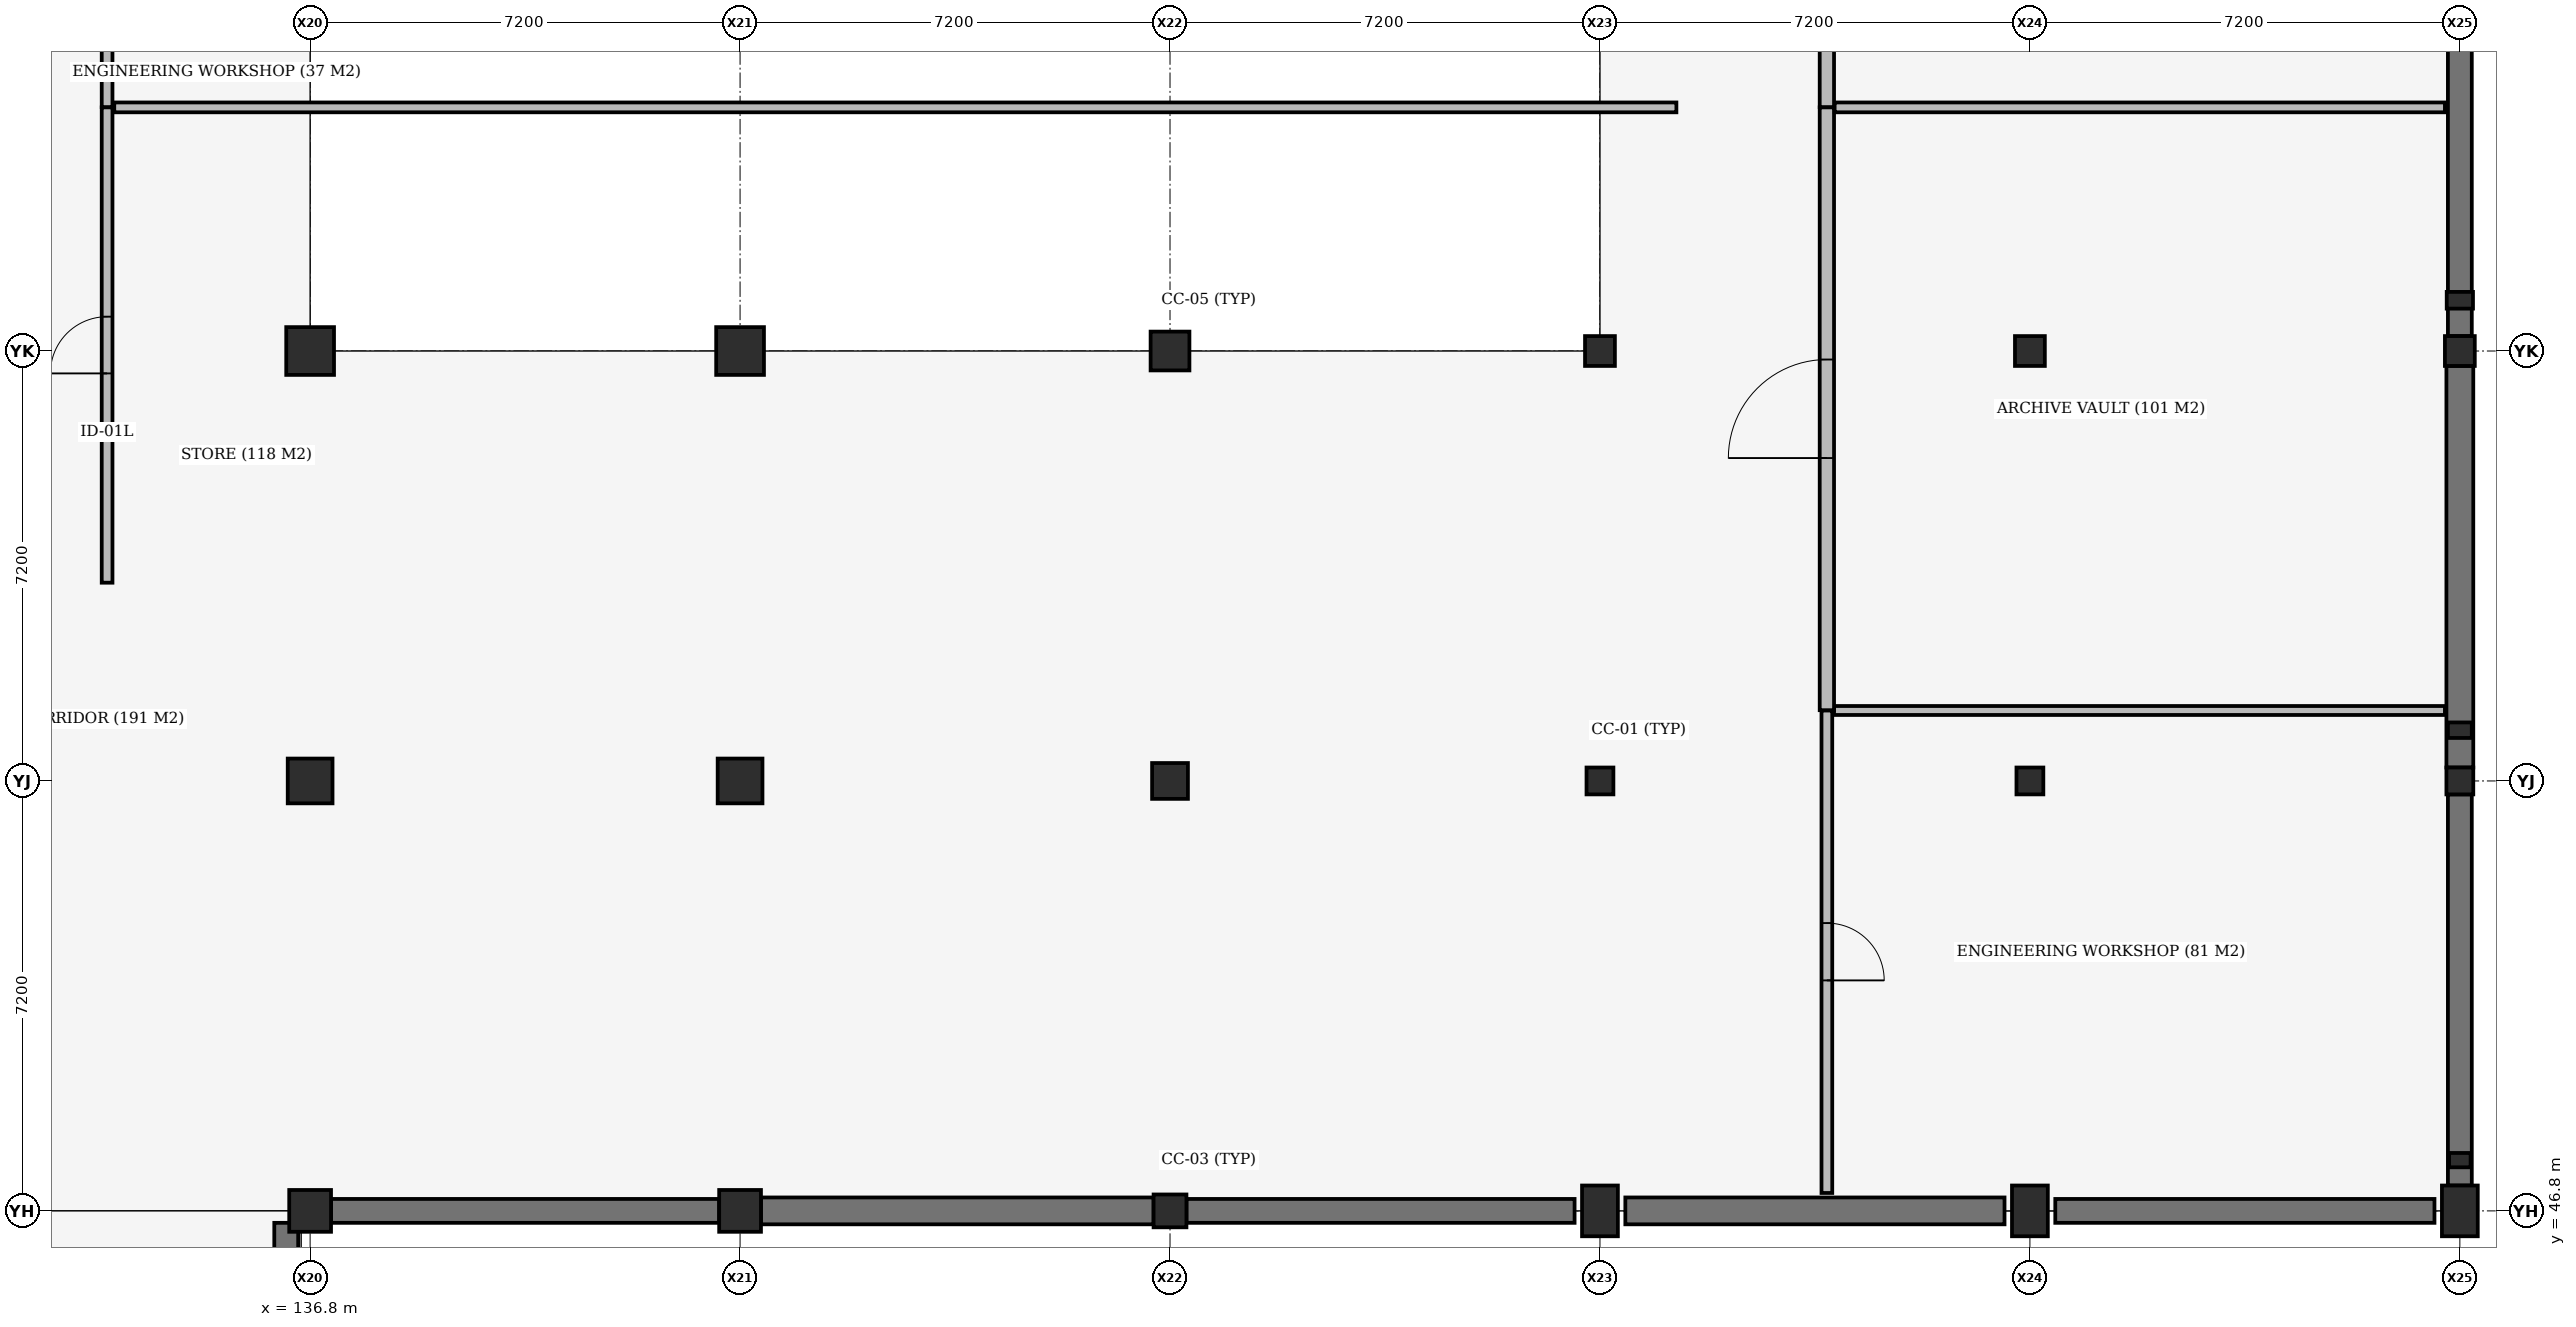
"""IFC4 building model, lengths in metres.
Left out: names, types, materials, properties, quantities, classifications, styles, units other than length and angle.
Written with IfcOpenShell. Run it as: python <this file> out.ifc"""

import sys

from ifc_helpers import new_model, si_unit, direction, frame, frame_2d, origin, origin_2d, place, context, subcontext, project, spatial, rectangle, extrude, element, fill, save


model = new_model("IFC4")
c1 = context("Model", 3, precision=1e-05, world=origin(), true_north=direction((0.0, 1.0)))
c2 = subcontext(c1, "Body", "Model", "MODEL_VIEW")
j1 = project(units=[si_unit("LENGTHUNIT", "METRE"), si_unit("PLANEANGLEUNIT", "RADIAN")], contexts=[c1])
p1 = place(None, origin())
s1 = spatial("IfcSite", under=j1, at=p1, CompositionType="ELEMENT")
p2 = place(p1, origin())
s2 = spatial("IfcBuilding", under=s1, at=p2, CompositionType="ELEMENT")
p3 = place(p2, frame((0.0, 0.0, -4.5)))
s3 = spatial("IfcBuildingStorey", under=s2, at=p3, CompositionType="ELEMENT", Elevation=-4.5)
p4 = place(p3, frame((136.8, 46.8, -0.42), z_axis=(0.0, 0.0, 1.0), x_axis=(1.0, 0.0, 0.0)))
e1 = element("IfcColumn", 1, at=p4, inside=s3, PredefinedType="COLUMN", context=c2, shape_type="SweptSolid", body=[
    extrude(rectangle(XDim=0.7, YDim=0.7, at=origin_2d()), origin(), (0.0, 0.0, 1.0), 4.6),
])
p5 = place(p3, frame((136.8, 54.0, -0.42), z_axis=(0.0, 0.0, 1.0), x_axis=(1.0, 0.0, 0.0)))
e2 = element("IfcColumn", 2, at=p5, inside=s3, PredefinedType="COLUMN", context=c2, shape_type="SweptSolid", body=[
    extrude(rectangle(XDim=0.75, YDim=0.75, at=origin_2d()), origin(), (0.0, 0.0, 1.0), 4.6),
])
p6 = place(p3, frame((136.8, 61.2, -0.42), z_axis=(0.0, 0.0, 1.0), x_axis=(1.0, 0.0, 0.0)))
e3 = element("IfcColumn", 3, at=p6, inside=s3, PredefinedType="COLUMN", context=c2, shape_type="SweptSolid", body=[
    extrude(rectangle(XDim=0.8, YDim=0.8, at=origin_2d()), origin(), (0.0, 0.0, 1.0), 4.6),
])
p7 = place(p3, frame((144.0, 46.8, -0.42), z_axis=(0.0, 0.0, 1.0), x_axis=(1.0, 0.0, 0.0)))
e4 = element("IfcColumn", 4, at=p7, inside=s3, PredefinedType="COLUMN", context=c2, shape_type="SweptSolid", body=[
    extrude(rectangle(XDim=0.7, YDim=0.7, at=origin_2d()), origin(), (0.0, 0.0, 1.0), 4.6),
])
p8 = place(p3, frame((144.0, 54.0, -0.42), z_axis=(0.0, 0.0, 1.0), x_axis=(1.0, 0.0, 0.0)))
e5 = element("IfcColumn", 5, at=p8, inside=s3, PredefinedType="COLUMN", context=c2, shape_type="SweptSolid", body=[
    extrude(rectangle(XDim=0.75, YDim=0.75, at=origin_2d()), origin(), (0.0, 0.0, 1.0), 4.6),
])
p9 = place(p3, frame((144.0, 61.2, -0.42), z_axis=(0.0, 0.0, 1.0), x_axis=(1.0, 0.0, 0.0)))
e6 = element("IfcColumn", 6, at=p9, inside=s3, PredefinedType="COLUMN", context=c2, shape_type="SweptSolid", body=[
    extrude(rectangle(XDim=0.8, YDim=0.8, at=origin_2d()), origin(), (0.0, 0.0, 1.0), 4.6),
])
p10 = place(p3, frame((151.2, 46.8, -0.42), z_axis=(0.0, 0.0, 1.0), x_axis=(1.0, 0.0, 0.0)))
e7 = element("IfcColumn", 7, at=p10, inside=s3, PredefinedType="COLUMN", context=c2, shape_type="SweptSolid", body=[
    extrude(rectangle(XDim=0.55, YDim=0.55, at=origin_2d()), origin(), (0.0, 0.0, 1.0), 4.6),
])
p11 = place(p3, frame((151.2, 54.0, -0.42), z_axis=(0.0, 0.0, 1.0), x_axis=(1.0, 0.0, 0.0)))
e8 = element("IfcColumn", 8, at=p11, inside=s3, PredefinedType="COLUMN", context=c2, shape_type="SweptSolid", body=[
    extrude(rectangle(XDim=0.6, YDim=0.6, at=origin_2d()), origin(), (0.0, 0.0, 1.0), 4.6),
])
p12 = place(p3, frame((151.2, 61.2, -0.42), z_axis=(0.0, 0.0, 1.0), x_axis=(1.0, 0.0, 0.0)))
e9 = element("IfcColumn", 9, at=p12, inside=s3, PredefinedType="COLUMN", context=c2, shape_type="SweptSolid", body=[
    extrude(rectangle(XDim=0.65, YDim=0.65, at=origin_2d()), origin(), (0.0, 0.0, 1.0), 4.6),
])
p13 = place(p3, frame((158.4, 46.8, -0.42), z_axis=(0.0, 0.0, 1.0), x_axis=(1.0, 0.0, 0.0)))
e10 = element("IfcColumn", 10, at=p13, inside=s3, PredefinedType="COLUMN", context=c2, shape_type="SweptSolid", body=[
    extrude(rectangle(XDim=0.6, YDim=0.85, at=origin_2d()), origin(), (0.0, 0.0, 1.0), 4.6),
])
p14 = place(p3, frame((158.4, 54.0, -0.42), z_axis=(0.0, 0.0, 1.0), x_axis=(1.0, 0.0, 0.0)))
e11 = element("IfcColumn", 11, at=p14, inside=s3, PredefinedType="COLUMN", context=c2, shape_type="SweptSolid", body=[
    extrude(rectangle(XDim=0.45, YDim=0.45, at=origin_2d()), origin(), (0.0, 0.0, 1.0), 4.6),
])
p15 = place(p3, frame((158.4, 61.2, -0.42), z_axis=(0.0, 0.0, 1.0), x_axis=(1.0, 0.0, 0.0)))
e12 = element("IfcColumn", 12, at=p15, inside=s3, PredefinedType="COLUMN", context=c2, shape_type="SweptSolid", body=[
    extrude(rectangle(XDim=0.5, YDim=0.5, at=origin_2d()), origin(), (0.0, 0.0, 1.0), 4.6),
])
p16 = place(p3, frame((165.6, 46.8, -0.42), z_axis=(0.0, 0.0, 1.0), x_axis=(1.0, 0.0, 0.0)))
e13 = element("IfcColumn", 13, at=p16, inside=s3, PredefinedType="COLUMN", context=c2, shape_type="SweptSolid", body=[
    extrude(rectangle(XDim=0.6, YDim=0.85, at=origin_2d()), origin(), (0.0, 0.0, 1.0), 4.6),
])
p17 = place(p3, frame((165.6, 54.0, -0.42), z_axis=(0.0, 0.0, 1.0), x_axis=(1.0, 0.0, 0.0)))
e14 = element("IfcColumn", 14, at=p17, inside=s3, PredefinedType="COLUMN", context=c2, shape_type="SweptSolid", body=[
    extrude(rectangle(XDim=0.45, YDim=0.45, at=origin_2d()), origin(), (0.0, 0.0, 1.0), 4.6),
])
p18 = place(p3, frame((165.6, 61.2, -0.42), z_axis=(0.0, 0.0, 1.0), x_axis=(1.0, 0.0, 0.0)))
e15 = element("IfcColumn", 15, at=p18, inside=s3, PredefinedType="COLUMN", context=c2, shape_type="SweptSolid", body=[
    extrude(rectangle(XDim=0.5, YDim=0.5, at=origin_2d()), origin(), (0.0, 0.0, 1.0), 4.6),
])
p19 = place(p3, frame((172.8, 46.8, -0.42), z_axis=(0.0, 0.0, 1.0), x_axis=(1.0, 0.0, 0.0)))
e16 = element("IfcColumn", 16, at=p19, inside=s3, PredefinedType="COLUMN", context=c2, shape_type="SweptSolid", body=[
    extrude(rectangle(XDim=0.6, YDim=0.85, at=origin_2d()), origin(), (0.0, 0.0, 1.0), 4.6),
])
p20 = place(p3, frame((172.8, 54.0, -0.42), z_axis=(0.0, 0.0, 1.0), x_axis=(1.0, 0.0, 0.0)))
e17 = element("IfcColumn", 17, at=p20, inside=s3, PredefinedType="COLUMN", context=c2, shape_type="SweptSolid", body=[
    extrude(rectangle(XDim=0.45, YDim=0.45, at=origin_2d()), origin(), (0.0, 0.0, 1.0), 4.6),
])
p21 = place(p3, frame((172.8, 61.2, -0.42), z_axis=(0.0, 0.0, 1.0), x_axis=(1.0, 0.0, 0.0)))
e18 = element("IfcColumn", 18, at=p21, inside=s3, PredefinedType="COLUMN", context=c2, shape_type="SweptSolid", body=[
    extrude(rectangle(XDim=0.5, YDim=0.5, at=origin_2d()), origin(), (0.0, 0.0, 1.0), 4.6),
])
p22 = place(p3, frame((172.8, 47.65, -0.42), z_axis=(0.0, 0.0, 1.0), x_axis=(1.0, 0.0, 0.0)))
e19 = element("IfcColumn", 19, at=p22, inside=s3, PredefinedType="PILASTER", context=c2, shape_type="SweptSolid", body=[
    extrude(rectangle(XDim=0.36, YDim=0.24, at=origin_2d()), origin(), (0.0, 0.0, 1.0), 4.6),
])
p23 = place(p3, frame((172.8, 54.85, -0.42), z_axis=(0.0, 0.0, 1.0), x_axis=(1.0, 0.0, 0.0)))
e20 = element("IfcColumn", 20, at=p23, inside=s3, PredefinedType="PILASTER", context=c2, shape_type="SweptSolid", body=[
    extrude(rectangle(XDim=0.4, YDim=0.26, at=origin_2d()), origin(), (0.0, 0.0, 1.0), 4.6),
])
p24 = place(p3, frame((172.8, 62.05, -0.42), z_axis=(0.0, 0.0, 1.0), x_axis=(1.0, 0.0, 0.0)))
e21 = element("IfcColumn", 21, at=p24, inside=s3, PredefinedType="PILASTER", context=c2, shape_type="SweptSolid", body=[
    extrude(rectangle(XDim=0.44, YDim=0.28, at=origin_2d()), origin(), (0.0, 0.0, 1.0), 4.6),
])
p25 = place(p3, frame((137.15, 46.8, 0.0), z_axis=(0.0, 0.0, 1.0), x_axis=(1.0, 0.0, 0.0)))
e22 = element("IfcWall", 22, at=p25, inside=s3, PredefinedType="USERDEFINED", context=c2, shape_type="SweptSolid", body=[
    extrude(rectangle(XDim=6.5, YDim=0.4, at=frame_2d((3.25, 0.0))), origin(), (0.0, 0.0, 1.0), 4.18),
])
p26 = place(p3, frame((144.35, 46.8, 0.0), z_axis=(0.0, 0.0, 1.0), x_axis=(1.0, 0.0, 0.0)))
e23 = element("IfcWall", 23, at=p26, inside=s3, PredefinedType="USERDEFINED", context=c2, shape_type="SweptSolid", body=[
    extrude(rectangle(XDim=6.575, YDim=0.45, at=frame_2d((3.288, 0.0))), origin(), (0.0, 0.0, 1.0), 4.18),
])
p27 = place(p3, frame((151.475, 46.8, 0.0), z_axis=(0.0, 0.0, 1.0), x_axis=(1.0, 0.0, 0.0)))
e24 = element("IfcWall", 24, at=p27, inside=s3, PredefinedType="USERDEFINED", context=c2, shape_type="SweptSolid", body=[
    extrude(rectangle(XDim=6.5, YDim=0.4, at=frame_2d((3.25, 0.0))), origin(), (0.0, 0.0, 1.0), 4.18),
])
p28 = place(p3, frame((158.825, 46.8, 0.0), z_axis=(0.0, 0.0, 1.0), x_axis=(1.0, 0.0, 0.0)))
e25 = element("IfcWall", 25, at=p28, inside=s3, PredefinedType="USERDEFINED", context=c2, shape_type="SweptSolid", body=[
    extrude(rectangle(XDim=6.35, YDim=0.45, at=frame_2d((3.175, 0.0))), origin(), (0.0, 0.0, 1.0), 4.18),
])
p29 = place(p3, frame((166.025, 46.8, 0.0), z_axis=(0.0, 0.0, 1.0), x_axis=(1.0, 0.0, 0.0)))
e26 = element("IfcWall", 26, at=p29, inside=s3, PredefinedType="USERDEFINED", context=c2, shape_type="SweptSolid", body=[
    extrude(rectangle(XDim=6.35, YDim=0.4, at=frame_2d((3.175, 0.0))), origin(), (0.0, 0.0, 1.0), 4.18),
])
p30 = place(p3, frame((172.8, 47.225, 0.0), z_axis=(0.0, 0.0, 1.0), x_axis=(0.0, 1.0, 0.0)))
e27 = element("IfcWall", 27, at=p30, inside=s3, PredefinedType="USERDEFINED", context=c2, shape_type="SweptSolid", body=[
    extrude(rectangle(XDim=6.55, YDim=0.4, at=frame_2d((3.275, 0.0))), origin(), (0.0, 0.0, 1.0), 4.18),
])
p31 = place(p3, frame((172.8, 54.225, 0.0), z_axis=(0.0, 0.0, 1.0), x_axis=(0.0, 1.0, 0.0)))
e28 = element("IfcWall", 28, at=p31, inside=s3, PredefinedType="USERDEFINED", context=c2, shape_type="SweptSolid", body=[
    extrude(rectangle(XDim=6.725, YDim=0.45, at=frame_2d((3.362, 0.0))), origin(), (0.0, 0.0, 1.0), 4.18),
])
p32 = place(p3, frame((172.8, 61.45, 0.0), z_axis=(0.0, 0.0, 1.0), x_axis=(0.0, 1.0, 0.0)))
e29 = element("IfcWall", 29, at=p32, inside=s3, PredefinedType="USERDEFINED", context=c2, shape_type="SweptSolid", body=[
    extrude(rectangle(XDim=6.675, YDim=0.4, at=frame_2d((3.337, 0.0))), origin(), (0.0, 0.0, 1.0), 4.18),
])
p33 = place(p3, frame((136.4, 43.4, 0.0), z_axis=(0.0, 0.0, 1.0), x_axis=(0.0, 1.0, 0.0)))
e30 = element("IfcWall", 30, at=p33, inside=s3, PredefinedType="USERDEFINED", context=c2, shape_type="SweptSolid", body=[
    extrude(rectangle(XDim=3.2, YDim=0.4, at=frame_2d((1.6, 0.0))), origin(), (0.0, 0.0, 1.0), 4.235),
])
p34 = place(p3, frame((133.4, 57.32, 0.0), z_axis=(0.0, 0.0, 1.0), x_axis=(0.0, 1.0, 0.0)))
e31 = element("IfcWall", 31, at=p34, inside=s3, PredefinedType="PARTITIONING", context=c2, shape_type="SweptSolid", body=[
    extrude(rectangle(XDim=7.96, YDim=0.18, at=frame_2d((3.98, 0.0))), origin(), (0.0, 0.0, 1.0), 3.53),
])
p35 = place(p34, frame((3.505, 0.0, 0.0)))
e32 = element("IfcOpeningElement", 32, at=p35, cuts=e31, PredefinedType="OPENING", context=c2, shape_type="SweptSolid", body=[
    extrude(rectangle(XDim=0.95, YDim=2.15, at=frame_2d((0.475, 1.075))), frame((0.0, 0.1, 0.0), z_axis=(0.0, -1.0, 0.0), x_axis=(1.0, 0.0, 0.0)), (0.0, 0.0, 1.0), 0.2),
])
p36 = place(p3, frame((133.52, 65.28, 0.0), z_axis=(0.0, 0.0, 1.0), x_axis=(1.0, 0.0, 0.0)))
e33 = element("IfcWall", 33, at=p36, inside=s3, PredefinedType="PARTITIONING", context=c2, shape_type="SweptSolid", body=[
    extrude(rectangle(XDim=26.16, YDim=0.165, at=frame_2d((13.08, 0.0))), origin(), (0.0, 0.0, 1.0), 3.53),
])
p37 = place(p3, frame((133.4, 65.285, 0.0), z_axis=(0.0, 0.0, 1.0), x_axis=(0.0, 1.0, 0.0)))
e34 = element("IfcWall", 34, at=p37, inside=s3, PredefinedType="PARTITIONING", context=c2, shape_type="SweptSolid", body=[
    extrude(rectangle(XDim=4.11, YDim=0.18, at=frame_2d((2.055, 0.0))), origin(), (0.0, 0.0, 1.0), 3.43),
])
p38 = place(p37, frame((1.575, 0.0, 0.0)))
e35 = element("IfcOpeningElement", 35, at=p38, cuts=e34, PredefinedType="OPENING", context=c2, shape_type="SweptSolid", body=[
    extrude(rectangle(XDim=0.96, YDim=2.15, at=frame_2d((0.48, 1.075))), frame((0.0, 0.1, 0.0), z_axis=(0.0, -1.0, 0.0), x_axis=(1.0, 0.0, 0.0)), (0.0, 0.0, 1.0), 0.2),
])
p39 = place(p3, frame((162.2, 47.1, 0.0), z_axis=(0.0, 0.0, 1.0), x_axis=(0.0, 1.0, 0.0)))
e36 = element("IfcWall", 36, at=p39, inside=s3, PredefinedType="PARTITIONING", context=c2, shape_type="SweptSolid", body=[
    extrude(rectangle(XDim=8.08, YDim=0.18, at=frame_2d((4.04, 0.0))), origin(), (0.0, 0.0, 1.0), 3.43),
])
p40 = place(p39, frame((3.56, 0.0, 0.0)))
e37 = element("IfcOpeningElement", 37, at=p40, cuts=e36, PredefinedType="OPENING", context=c2, shape_type="SweptSolid", body=[
    extrude(rectangle(XDim=0.96, YDim=2.15, at=frame_2d((0.48, 1.075))), frame((0.0, 0.1, 0.0), z_axis=(0.0, -1.0, 0.0), x_axis=(1.0, 0.0, 0.0)), (0.0, 0.0, 1.0), 0.2),
])
p41 = place(p3, frame((162.32, 55.18, 0.0), z_axis=(0.0, 0.0, 1.0), x_axis=(1.0, 0.0, 0.0)))
e38 = element("IfcWall", 38, at=p41, inside=s3, PredefinedType="PARTITIONING", context=c2, shape_type="SweptSolid", body=[
    extrude(rectangle(XDim=10.23, YDim=0.15, at=frame_2d((5.115, 0.0))), origin(), (0.0, 0.0, 1.0), 3.43),
])
p42 = place(p3, frame((162.2, 55.185, 0.0), z_axis=(0.0, 0.0, 1.0), x_axis=(0.0, 1.0, 0.0)))
e39 = element("IfcWall", 39, at=p42, inside=s3, PredefinedType="STANDARD", context=c2, shape_type="SweptSolid", body=[
    extrude(rectangle(XDim=10.095, YDim=0.24, at=frame_2d((5.047, 0.0))), origin(), (0.0, 0.0, 1.0), 3.58),
])
p43 = place(p42, frame((4.222, 0.0, 0.0)))
e40 = element("IfcOpeningElement", 40, at=p43, cuts=e39, PredefinedType="OPENING", context=c2, shape_type="SweptSolid", body=[
    extrude(rectangle(XDim=1.65, YDim=2.25, at=frame_2d((0.825, 1.125))), frame((0.0, 0.13, 0.0), z_axis=(0.0, -1.0, 0.0), x_axis=(1.0, 0.0, 0.0)), (0.0, 0.0, 1.0), 0.26),
])
p44 = place(p3, frame((162.33, 65.28, 0.0), z_axis=(0.0, 0.0, 1.0), x_axis=(1.0, 0.0, 0.0)))
e41 = element("IfcWall", 41, at=p44, inside=s3, PredefinedType="PARTITIONING", context=c2, shape_type="SweptSolid", body=[
    extrude(rectangle(XDim=10.22, YDim=0.165, at=frame_2d((5.11, 0.0))), origin(), (0.0, 0.0, 1.0), 3.38),
])
p45 = place(p3, frame((162.2, 65.285, 0.0), z_axis=(0.0, 0.0, 1.0), x_axis=(0.0, 1.0, 0.0)))
e42 = element("IfcWall", 42, at=p45, inside=s3, PredefinedType="STANDARD", context=c2, shape_type="SweptSolid", body=[
    extrude(rectangle(XDim=4.11, YDim=0.24, at=frame_2d((2.055, 0.0))), origin(), (0.0, 0.0, 1.0), 3.38),
])
p46 = place(p45, frame((1.23, 0.0, 0.0)))
e43 = element("IfcOpeningElement", 43, at=p46, cuts=e42, PredefinedType="OPENING", context=c2, shape_type="SweptSolid", body=[
    extrude(rectangle(XDim=1.65, YDim=2.25, at=frame_2d((0.825, 1.125))), frame((0.0, 0.13, 0.0), z_axis=(0.0, -1.0, 0.0), x_axis=(1.0, 0.0, 0.0)), (0.0, 0.0, 1.0), 0.26),
])
p47 = place(p35, origin())
e44 = element("IfcDoor", 44, at=p47, inside=s3, OperationType="SINGLE_SWING_LEFT", PredefinedType="DOOR", context=c2, shape_type="SweptSolid", body=[
    extrude(rectangle(XDim=0.95, YDim=2.15, at=frame_2d((0.475, 1.075))), frame((0.0, 0.025, 0.0), z_axis=(0.0, -1.0, 0.0), x_axis=(1.0, 0.0, 0.0)), (0.0, 0.0, 1.0), 0.05),
])
fill(e32, e44)
p48 = place(p40, origin())
e45 = element("IfcDoor", 45, at=p48, inside=s3, OperationType="SINGLE_SWING_RIGHT", PredefinedType="DOOR", context=c2, shape_type="SweptSolid", body=[
    extrude(rectangle(XDim=0.96, YDim=2.15, at=frame_2d((0.48, 1.075))), frame((0.0, 0.025, 0.0), z_axis=(0.0, -1.0, 0.0), x_axis=(1.0, 0.0, 0.0)), (0.0, 0.0, 1.0), 0.05),
])
fill(e37, e45)
p49 = place(p43, origin())
e46 = element("IfcDoor", 46, at=p49, inside=s3, OperationType="DOUBLE_DOOR_SINGLE_SWING", PredefinedType="DOOR", context=c2, shape_type="SweptSolid", body=[
    extrude(rectangle(XDim=1.65, YDim=2.25, at=frame_2d((0.825, 1.125))), frame((0.0, 0.025, 0.0), z_axis=(0.0, -1.0, 0.0), x_axis=(1.0, 0.0, 0.0)), (0.0, 0.0, 1.0), 0.05),
])
fill(e40, e46)
save(model, sys.argv[1])
